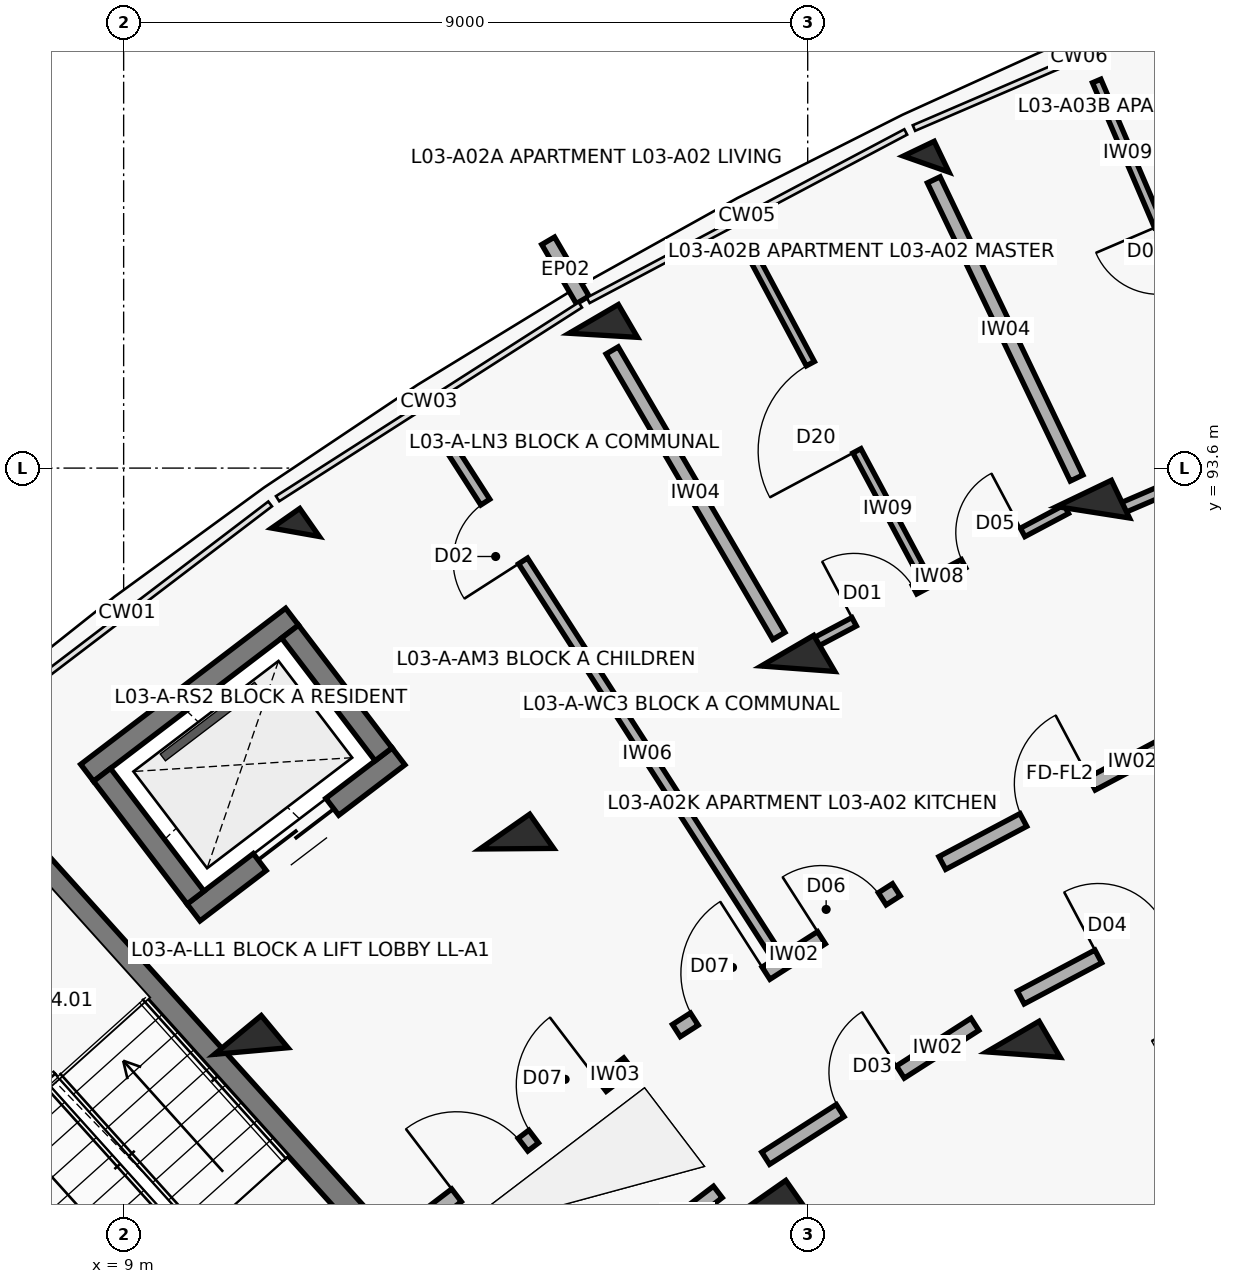
"""IFC4 building model, lengths in metres.
Left out: names, types, materials, properties, quantities, classifications, styles, units other than length and angle.
Written with IfcOpenShell. Run it as: python <this file> out.ifc"""

import sys

from ifc_helpers import new_model, si_unit, direction, frame, frame_2d, origin, origin_2d, place, context, subcontext, project, spatial, rectangle, extrude, element, fill, save


model = new_model("IFC4")
c1 = context("Model", 3, precision=1e-05, world=origin(), true_north=direction((0.0, 1.0)))
c2 = subcontext(c1, "Body", "Model", "MODEL_VIEW")
j1 = project(units=[si_unit("LENGTHUNIT", "METRE"), si_unit("PLANEANGLEUNIT", "RADIAN")], contexts=[c1])
p1 = place(None, origin())
s1 = spatial("IfcSite", under=j1, at=p1, CompositionType="ELEMENT")
p2 = place(p1, origin())
s2 = spatial("IfcBuilding", under=s1, at=p2, CompositionType="ELEMENT")
p3 = place(p2, frame((0.0, 0.0, 11.2)))
s3 = spatial("IfcBuildingStorey", under=s2, at=p3, CompositionType="ELEMENT", Elevation=11.2)
for number, where, z_axis, x_axis in (
    (1, (10.678, 85.93, 0.0), (0.0, 0.0, 1.0), (-0.638, 0.77, 0.0)),
    (2, (17.542, 83.773, 0.0), (0.0, 0.0, 1.0), (-0.573, 0.82, 0.0)),
    (3, (14.172, 88.592, 0.0), (0.0, 0.0, 1.0), (-0.573, 0.82, 0.0)),
):
    element("IfcColumn", number, at=place(p3, frame(where, z_axis=z_axis, x_axis=x_axis)), inside=s3, PredefinedType="COLUMN", context=c2, shape_type="SweptSolid", body=[
        extrude(rectangle(XDim=0.55, YDim=0.8, at=origin_2d()), origin(), (0.0, 0.0, 1.0), 3.1),
    ])
p4 = place(p3, frame((11.261, 92.755, 0.0), z_axis=(0.0, 0.0, 1.0), x_axis=(-0.573004420611, 0.819552276527, 0.0)))
e4 = element("IfcColumn", 4, at=p4, inside=s3, PredefinedType="COLUMN", context=c2, shape_type="SweptSolid", body=[
    extrude(rectangle(XDim=0.45, YDim=0.45, at=origin_2d()), origin(), (0.0, 0.0, 1.0), 3.1),
])
for number, where, z_axis, x_axis in (
    (5, (20.837, 85.882, 0.0), (0.0, 0.0, 1.0), (-0.504, 0.864, 0.0)),
    (6, (17.873, 90.96, 0.0), (0.0, 0.0, 1.0), (-0.504, 0.864, 0.0)),
):
    element("IfcColumn", number, at=place(p3, frame(where, z_axis=z_axis, x_axis=x_axis)), inside=s3, PredefinedType="COLUMN", context=c2, shape_type="SweptSolid", body=[
        extrude(rectangle(XDim=0.55, YDim=0.8, at=origin_2d()), origin(), (0.0, 0.0, 1.0), 3.1),
    ])
p5 = place(p3, frame((15.311, 95.347, 0.0), z_axis=(0.0, 0.0, 1.0), x_axis=(-0.504226211181, 0.863571611366, 0.0)))
e7 = element("IfcColumn", 7, at=p5, inside=s3, PredefinedType="COLUMN", context=c2, shape_type="SweptSolid", body=[
    extrude(rectangle(XDim=0.5, YDim=0.75, at=origin_2d()), origin(), (0.0, 0.0, 1.0), 3.1),
])
p6 = place(p3, frame((21.754, 93.019, 0.0), z_axis=(0.0, 0.0, 1.0), x_axis=(-0.432085748802, 0.901832526405, 0.0)))
e8 = element("IfcColumn", 8, at=p6, inside=s3, PredefinedType="COLUMN", context=c2, shape_type="SweptSolid", body=[
    extrude(rectangle(XDim=0.55, YDim=0.8, at=origin_2d()), origin(), (0.0, 0.0, 1.0), 3.1),
])
p7 = place(p3, frame((19.559, 97.6, 0.0), z_axis=(0.0, 0.0, 1.0), x_axis=(-0.432085748802, 0.901832526405, 0.0)))
e9 = element("IfcColumn", 9, at=p7, inside=s3, PredefinedType="COLUMN", context=c2, shape_type="SweptSolid", body=[
    extrude(rectangle(XDim=0.45, YDim=0.45, at=origin_2d()), origin(), (0.0, 0.0, 1.0), 3.1),
])
p8 = place(p3, frame((15.039, 95.813, 0.0), z_axis=(0.0, 0.0, 1.0), x_axis=(-0.504326383773, 0.863513114336, 0.0)))
e10 = element("IfcWall", 10, at=p8, inside=s3, PredefinedType="PARAPET", context=c2, shape_type="SweptSolid", body=[
    extrude(rectangle(XDim=0.9, YDim=0.195, at=frame_2d((0.45, 0.0))), origin(), (0.0, 0.0, 1.0), 2.25),
])
p9 = place(p3, frame((22.519, 83.042, 0.0), z_axis=(0.0, 0.0, 1.0), x_axis=(0.883438308286, 0.468547495407, 0.0)))
e11 = element("IfcWall", 11, at=p9, inside=s3, PredefinedType="SOLIDWALL", context=c2, shape_type="SweptSolid", body=[
    extrude(rectangle(XDim=3.604, YDim=0.245, at=frame_2d((1.802, 0.0))), origin(), (0.0, 0.0, 1.0), 2.25),
])
p10 = place(p9, frame((0.4, 0.0, 0.0)))
e12 = element("IfcOpeningElement", 12, at=p10, cuts=e11, PredefinedType="OPENING", context=c2, shape_type="SweptSolid", body=[
    extrude(rectangle(XDim=1.1, YDim=2.15, at=frame_2d((0.55, 1.075))), frame((0.0, 0.133, 0.0), z_axis=(0.0, -1.0, 0.0), x_axis=(1.0, 0.0, 0.0)), (0.0, 0.0, 1.0), 0.265),
])
p11 = place(p9, frame((1.754, 0.0, 0.35)))
e13 = element("IfcOpeningElement", 13, at=p11, cuts=e11, PredefinedType="OPENING", context=c2, shape_type="SweptSolid", body=[
    extrude(rectangle(XDim=1.5, YDim=1.65, at=frame_2d((0.75, 0.825))), frame((0.0, 0.133, 0.0), z_axis=(0.0, -1.0, 0.0), x_axis=(1.0, 0.0, 0.0)), (0.0, 0.0, 1.0), 0.265),
])
p12 = place(p3, frame((12.345, 83.461, 0.0), z_axis=(0.0, 0.0, 1.0), x_axis=(-0.668868253964, 0.743380964808, 0.0)))
e14 = element("IfcWall", 14, at=p12, inside=s3, PredefinedType="SHEAR", context=c2, shape_type="SweptSolid", body=[
    extrude(rectangle(XDim=7.69, YDim=0.3, at=frame_2d((3.845, 0.0))), origin(), (0.0, 0.0, 1.0), 3.1),
])
p13 = place(p3, frame((9.691, 81.073, 0.0), z_axis=(0.0, 0.0, 1.0), x_axis=(-0.668885797871, 0.743365179038, 0.0)))
e15 = element("IfcWall", 15, at=p13, inside=s3, PredefinedType="SHEAR", context=c2, shape_type="SweptSolid", body=[
    extrude(rectangle(XDim=7.69, YDim=0.3, at=frame_2d((3.845, 0.0))), origin(), (0.0, 0.0, 1.0), 3.1),
])
p14 = place(p3, frame((12.616, 89.807, 0.0), z_axis=(0.0, 0.0, 1.0), x_axis=(-0.795474703455, -0.605986795371, 0.0)))
e16 = element("IfcWall", 16, at=p14, inside=s3, PredefinedType="SHEAR", context=c2, shape_type="SweptSolid", body=[
    extrude(rectangle(XDim=3.39, YDim=0.28, at=frame_2d((1.695, 0.0))), origin(), (0.0, 0.0, 1.0), 3.1),
])
p15 = place(p14, frame((1.095, 0.0, 0.0)))
e17 = element("IfcOpeningElement", 17, at=p15, cuts=e16, PredefinedType="OPENING", context=c2, shape_type="SweptSolid", body=[
    extrude(rectangle(XDim=1.2, YDim=2.15, at=frame_2d((0.6, 1.075))), frame((0.0, 0.15, 0.0), z_axis=(0.0, -1.0, 0.0), x_axis=(1.0, 0.0, 0.0)), (0.0, 0.0, 1.0), 0.3),
])
p16 = place(p3, frame((11.216, 91.645, 0.0), z_axis=(0.0, 0.0, 1.0), x_axis=(-0.795439986025, -0.606032365994, 0.0)))
e18 = element("IfcWall", 18, at=p16, inside=s3, PredefinedType="SHEAR", context=c2, shape_type="SweptSolid", body=[
    extrude(rectangle(XDim=3.39, YDim=0.28, at=frame_2d((1.695, 0.0))), origin(), (0.0, 0.0, 1.0), 3.1),
])
p17 = place(p3, frame((12.42, 89.834, 0.0), z_axis=(0.0, 0.0, 1.0), x_axis=(-0.605948992168, 0.795503500238, 0.0)))
e19 = element("IfcWall", 19, at=p17, inside=s3, PredefinedType="SHEAR", context=c2, shape_type="SweptSolid", body=[
    extrude(rectangle(XDim=2.03, YDim=0.28, at=frame_2d((1.015, 0.0))), origin(), (0.0, 0.0, 1.0), 3.1),
])
p18 = place(p3, frame((9.946, 87.949, 0.0), z_axis=(0.0, 0.0, 1.0), x_axis=(-0.605891019062, 0.795547656033, 0.0)))
e20 = element("IfcWall", 20, at=p18, inside=s3, PredefinedType="SHEAR", context=c2, shape_type="SweptSolid", body=[
    extrude(rectangle(XDim=2.03, YDim=0.28, at=frame_2d((1.015, 0.0))), origin(), (0.0, 0.0, 1.0), 3.1),
])
p19 = place(p3, frame((13.021, 83.759, 0.0), z_axis=(0.0, 0.0, 1.0), x_axis=(0.795498026433, 0.605956178235, 0.0)))
e21 = element("IfcWall", 21, at=p19, inside=s3, PredefinedType="SOLIDWALL", context=c2, shape_type="SweptSolid", body=[
    extrude(rectangle(XDim=3.296, YDim=0.21, at=frame_2d((1.648, 0.0))), origin(), (0.0, 0.0, 1.0), 2.08),
])
p20 = place(p19, frame((0.45, 0.0, 0.0)))
e22 = element("IfcOpeningElement", 22, at=p20, cuts=e21, PredefinedType="OPENING", context=c2, shape_type="SweptSolid", body=[
    extrude(rectangle(XDim=1.1, YDim=2.15, at=frame_2d((0.55, 1.075))), frame((0.0, 0.115, 0.0), z_axis=(0.0, -1.0, 0.0), x_axis=(1.0, 0.0, 0.0)), (0.0, 0.0, 1.0), 0.23),
])
p21 = place(p19, frame((1.726, 0.0, 0.0)))
e23 = element("IfcOpeningElement", 23, at=p21, cuts=e21, PredefinedType="OPENING", context=c2, shape_type="SweptSolid", body=[
    extrude(rectangle(XDim=1.12, YDim=2.15, at=frame_2d((0.56, 1.075))), frame((0.0, 0.115, 0.0), z_axis=(0.0, -1.0, 0.0), x_axis=(1.0, 0.0, 0.0)), (0.0, 0.0, 1.0), 0.23),
])
p22 = place(p3, frame((14.329, 82.18, 0.0), z_axis=(0.0, 0.0, 1.0), x_axis=(0.795501577908, 0.605951515838, 0.0)))
e24 = element("IfcWall", 24, at=p22, inside=s3, PredefinedType="SOLIDWALL", context=c2, shape_type="SweptSolid", body=[
    extrude(rectangle(XDim=3.129, YDim=0.19, at=frame_2d((1.564, 0.0))), origin(), (0.0, 0.0, 1.0), 2.08),
])
p23 = place(p22, frame((1.004, 0.0, 0.0)))
e25 = element("IfcOpeningElement", 25, at=p23, cuts=e24, PredefinedType="OPENING", context=c2, shape_type="SweptSolid", body=[
    extrude(rectangle(XDim=1.12, YDim=2.15, at=frame_2d((0.56, 1.075))), frame((0.0, 0.105, 0.0), z_axis=(0.0, -1.0, 0.0), x_axis=(1.0, 0.0, 0.0)), (0.0, 0.0, 1.0), 0.21),
])
p24 = place(p3, frame((16.272, 86.199, 0.0), z_axis=(0.0, 0.0, 1.0), x_axis=(0.842257205985, 0.539075874963, 0.0)))
e26 = element("IfcWall", 26, at=p24, inside=s3, PredefinedType="SOLIDWALL", context=c2, shape_type="SweptSolid", body=[
    extrude(rectangle(XDim=3.436, YDim=0.19, at=frame_2d((1.718, 0.0))), origin(), (0.0, 0.0, 1.0), 2.08),
])
p25 = place(p24, frame((0.28, 0.0, 0.0)))
e27 = element("IfcOpeningElement", 27, at=p25, cuts=e26, PredefinedType="OPENING", context=c2, shape_type="SweptSolid", body=[
    extrude(rectangle(XDim=1.12, YDim=2.15, at=frame_2d((0.56, 1.075))), frame((0.0, 0.105, 0.0), z_axis=(0.0, -1.0, 0.0), x_axis=(1.0, 0.0, 0.0)), (0.0, 0.0, 1.0), 0.21),
])
p26 = place(p24, frame((2.266, 0.0, 0.0)))
e28 = element("IfcOpeningElement", 28, at=p26, cuts=e26, PredefinedType="OPENING", context=c2, shape_type="SweptSolid", body=[
    extrude(rectangle(XDim=0.95, YDim=2.1, at=frame_2d((0.475, 1.05))), frame((0.0, 0.105, 0.0), z_axis=(0.0, -1.0, 0.0), x_axis=(1.0, 0.0, 0.0)), (0.0, 0.0, 1.0), 0.21),
])
p27 = place(p3, frame((17.447, 84.519, 0.0), z_axis=(0.0, 0.0, 1.0), x_axis=(0.842225276846, 0.539125758095, 0.0)))
e29 = element("IfcWall", 29, at=p27, inside=s3, PredefinedType="SOLIDWALL", context=c2, shape_type="SweptSolid", body=[
    extrude(rectangle(XDim=3.269, YDim=0.19, at=frame_2d((1.634, 0.0))), origin(), (0.0, 0.0, 1.0), 2.08),
])
p28 = place(p27, frame((1.164, 0.0, 0.0)))
e30 = element("IfcOpeningElement", 30, at=p28, cuts=e29, PredefinedType="OPENING", context=c2, shape_type="SweptSolid", body=[
    extrude(rectangle(XDim=0.94, YDim=2.1, at=frame_2d((0.47, 1.05))), frame((0.0, 0.105, 0.0), z_axis=(0.0, -1.0, 0.0), x_axis=(1.0, 0.0, 0.0)), (0.0, 0.0, 1.0), 0.21),
])
p29 = place(p3, frame((17.524, 87.288, 0.0), z_axis=(0.0, 0.0, 1.0), x_axis=(-0.540338452216, 0.841447774408, 0.0)))
e31 = element("IfcWall", 31, at=p29, inside=s3, PredefinedType="PARTITIONING", context=c2, shape_type="SweptSolid", body=[
    extrude(rectangle(XDim=7.95, YDim=0.14, at=frame_2d((3.975, 0.0))), origin(), (0.0, 0.0, 1.0), 2.08),
])
p30 = place(p29, frame((6.05, 0.0, 0.0)))
e32 = element("IfcOpeningElement", 32, at=p30, cuts=e31, PredefinedType="OPENING", context=c2, shape_type="SweptSolid", body=[
    extrude(rectangle(XDim=0.92, YDim=2.1, at=frame_2d((0.46, 1.05))), frame((0.0, 0.08, 0.0), z_axis=(0.0, -1.0, 0.0), x_axis=(1.0, 0.0, 0.0)), (0.0, 0.0, 1.0), 0.16),
])
p31 = place(p3, frame((19.77, 88.404, 0.0), z_axis=(0.0, 0.0, 1.0), x_axis=(0.883410853063, 0.468599258099, 0.0)))
e33 = element("IfcWall", 33, at=p31, inside=s3, PredefinedType="SOLIDWALL", context=c2, shape_type="SweptSolid", body=[
    extrude(rectangle(XDim=3.436, YDim=0.19, at=frame_2d((1.718, 0.0))), origin(), (0.0, 0.0, 1.0), 2.08),
])
p32 = place(p31, frame((1.208, 0.0, 0.0)))
e34 = element("IfcOpeningElement", 34, at=p32, cuts=e33, PredefinedType="OPENING", context=c2, shape_type="SweptSolid", body=[
    extrude(rectangle(XDim=1.02, YDim=2.15, at=frame_2d((0.51, 1.075))), frame((0.0, 0.105, 0.0), z_axis=(0.0, -1.0, 0.0), x_axis=(1.0, 0.0, 0.0)), (0.0, 0.0, 1.0), 0.21),
])
p33 = place(p3, frame((20.804, 86.634, 0.0), z_axis=(0.0, 0.0, 1.0), x_axis=(0.883444301944, 0.468536194293, 0.0)))
e35 = element("IfcWall", 35, at=p33, inside=s3, PredefinedType="SOLIDWALL", context=c2, shape_type="SweptSolid", body=[
    extrude(rectangle(XDim=3.269, YDim=0.19, at=frame_2d((1.634, 0.0))), origin(), (0.0, 0.0, 1.0), 2.08),
])
p34 = place(p33, frame((1.154, 0.0, 0.0)))
e36 = element("IfcOpeningElement", 36, at=p34, cuts=e35, PredefinedType="OPENING", context=c2, shape_type="SweptSolid", body=[
    extrude(rectangle(XDim=0.96, YDim=2.1, at=frame_2d((0.48, 1.05))), frame((0.0, 0.105, 0.0), z_axis=(0.0, -1.0, 0.0), x_axis=(1.0, 0.0, 0.0)), (0.0, 0.0, 1.0), 0.21),
])
p35 = place(p3, frame((18.037, 91.273, 0.0), z_axis=(0.0, 0.0, 1.0), x_axis=(0.883441603894, 0.468541281543, 0.0)))
e37 = element("IfcWall", 37, at=p35, inside=s3, PredefinedType="PARTITIONING", context=c2, shape_type="SweptSolid", body=[
    extrude(rectangle(XDim=3.81, YDim=0.125, at=frame_2d((1.905, 0.0))), origin(), (0.0, 0.0, 1.0), 2.08),
])
p36 = place(p35, frame((0.65, 0.0, 0.0)))
e38 = element("IfcOpeningElement", 38, at=p36, cuts=e37, PredefinedType="OPENING", context=c2, shape_type="SweptSolid", body=[
    extrude(rectangle(XDim=0.9, YDim=2.1, at=frame_2d((0.45, 1.05))), frame((0.0, 0.073, 0.0), z_axis=(0.0, -1.0, 0.0), x_axis=(1.0, 0.0, 0.0)), (0.0, 0.0, 1.0), 0.145),
])
p37 = place(p35, frame((2.28, 0.0, 0.0)))
e39 = element("IfcOpeningElement", 39, at=p37, cuts=e37, PredefinedType="OPENING", context=c2, shape_type="SweptSolid", body=[
    extrude(rectangle(XDim=0.88, YDim=2.1, at=frame_2d((0.44, 1.05))), frame((0.0, 0.073, 0.0), z_axis=(0.0, -1.0, 0.0), x_axis=(1.0, 0.0, 0.0)), (0.0, 0.0, 1.0), 0.145),
])
p38 = place(p3, frame((19.46, 92.306, 0.0), z_axis=(0.0, 0.0, 1.0), x_axis=(-0.471228378949, 0.88201123285, 0.0)))
e40 = element("IfcWall", 40, at=p38, inside=s3, PredefinedType="PARTITIONING", context=c2, shape_type="SweptSolid", body=[
    extrude(rectangle(XDim=4.75, YDim=0.12, at=frame_2d((2.375, 0.0))), origin(), (0.0, 0.0, 1.0), 2.08),
])
p39 = place(p38, frame((1.725, 0.0, 0.0)))
e41 = element("IfcOpeningElement", 41, at=p39, cuts=e40, PredefinedType="OPENING", context=c2, shape_type="SweptSolid", body=[
    extrude(rectangle(XDim=1.3, YDim=2.1, at=frame_2d((0.65, 1.05))), frame((0.0, 0.07, 0.0), z_axis=(0.0, -1.0, 0.0), x_axis=(1.0, 0.0, 0.0)), (0.0, 0.0, 1.0), 0.14),
])
p40 = place(p3, frame((17.621, 91.392, 0.0), z_axis=(0.0, 0.0, 1.0), x_axis=(-0.504216452091, 0.863577309475, 0.0)))
e42 = element("IfcWall", 42, at=p40, inside=s3, PredefinedType="SOLIDWALL", context=c2, shape_type="SweptSolid", body=[
    extrude(rectangle(XDim=4.35, YDim=0.185, at=frame_2d((2.175, 0.0))), origin(), (0.0, 0.0, 1.0), 2.08),
])
p41 = place(p3, frame((22.073, 93.047, 0.0), z_axis=(0.0, 0.0, 1.0), x_axis=(0.918737522346, 0.394868794707, 0.0)))
e43 = element("IfcWall", 43, at=p41, inside=s3, PredefinedType="PARTITIONING", context=c2, shape_type="SweptSolid", body=[
    extrude(rectangle(XDim=3.785, YDim=0.14, at=frame_2d((1.893, 0.0))), origin(), (0.0, 0.0, 1.0), 2.08),
])
p42 = place(p41, frame((0.65, 0.0, 0.0)))
e44 = element("IfcOpeningElement", 44, at=p42, cuts=e43, PredefinedType="OPENING", context=c2, shape_type="SweptSolid", body=[
    extrude(rectangle(XDim=0.9, YDim=2.1, at=frame_2d((0.45, 1.05))), frame((0.0, 0.08, 0.0), z_axis=(0.0, -1.0, 0.0), x_axis=(1.0, 0.0, 0.0)), (0.0, 0.0, 1.0), 0.16),
])
p43 = place(p41, frame((2.255, 0.0, 0.0)))
e45 = element("IfcOpeningElement", 45, at=p43, cuts=e43, PredefinedType="OPENING", context=c2, shape_type="SweptSolid", body=[
    extrude(rectangle(XDim=0.88, YDim=2.1, at=frame_2d((0.44, 1.05))), frame((0.0, 0.08, 0.0), z_axis=(0.0, -1.0, 0.0), x_axis=(1.0, 0.0, 0.0)), (0.0, 0.0, 1.0), 0.16),
])
p44 = place(p3, frame((23.789, 94.051, 0.0), z_axis=(0.0, 0.0, 1.0), x_axis=(-0.393539995583, 0.919307495823, 0.0)))
e46 = element("IfcWall", 46, at=p44, inside=s3, PredefinedType="PARTITIONING", context=c2, shape_type="SweptSolid", body=[
    extrude(rectangle(XDim=5.05, YDim=0.12, at=frame_2d((2.525, 0.0))), origin(), (0.0, 0.0, 1.0), 2.08),
])
p45 = place(p44, frame((2.075, 0.0, 0.0)))
e47 = element("IfcOpeningElement", 47, at=p45, cuts=e46, PredefinedType="OPENING", context=c2, shape_type="SweptSolid", body=[
    extrude(rectangle(XDim=0.9, YDim=2.1, at=frame_2d((0.45, 1.05))), frame((0.0, 0.07, 0.0), z_axis=(0.0, -1.0, 0.0), x_axis=(1.0, 0.0, 0.0)), (0.0, 0.0, 1.0), 0.14),
])
p46 = place(p3, frame((21.538, 93.469, 0.0), z_axis=(0.0, 0.0, 1.0), x_axis=(-0.432086898897, 0.901831975371, 0.0)))
e48 = element("IfcWall", 48, at=p46, inside=s3, PredefinedType="SOLIDWALL", context=c2, shape_type="SweptSolid", body=[
    extrude(rectangle(XDim=4.35, YDim=0.185, at=frame_2d((2.175, 0.0))), origin(), (0.0, 0.0, 1.0), 2.08),
])
p47 = place(p15, origin())
e49 = element("IfcDoor", 49, at=p47, inside=s3, OperationType="DOUBLE_DOOR_SLIDING", PredefinedType="DOOR", context=c2, shape_type="SweptSolid", body=[
    extrude(rectangle(XDim=1.2, YDim=2.15, at=frame_2d((0.6, 1.075))), frame((0.0, 0.025, 0.0), z_axis=(0.0, -1.0, 0.0), x_axis=(1.0, 0.0, 0.0)), (0.0, 0.0, 1.0), 0.05),
])
fill(e17, e49)
p48 = place(p20, origin())
e50 = element("IfcDoor", 50, at=p48, inside=s3, OperationType="SINGLE_SWING_LEFT", PredefinedType="DOOR", context=c2, shape_type="SweptSolid", body=[
    extrude(rectangle(XDim=1.1, YDim=2.15, at=frame_2d((0.55, 1.075))), frame((0.0, 0.025, 0.0), z_axis=(0.0, -1.0, 0.0), x_axis=(1.0, 0.0, 0.0)), (0.0, 0.0, 1.0), 0.05),
])
fill(e22, e50)
p49 = place(p21, origin())
e51 = element("IfcDoor", 51, at=p49, inside=s3, OperationType="SINGLE_SWING_RIGHT", PredefinedType="DOOR", context=c2, shape_type="SweptSolid", body=[
    extrude(rectangle(XDim=1.12, YDim=2.15, at=frame_2d((0.56, 1.075))), frame((0.0, 0.025, 0.0), z_axis=(0.0, -1.0, 0.0), x_axis=(1.0, 0.0, 0.0)), (0.0, 0.0, 1.0), 0.05),
])
fill(e23, e51)
p50 = place(p25, origin())
e52 = element("IfcDoor", 52, at=p50, inside=s3, OperationType="SINGLE_SWING_RIGHT", PredefinedType="DOOR", context=c2, shape_type="SweptSolid", body=[
    extrude(rectangle(XDim=1.12, YDim=2.15, at=frame_2d((0.56, 1.075))), frame((0.0, 0.025, 0.0), z_axis=(0.0, -1.0, 0.0), x_axis=(1.0, 0.0, 0.0)), (0.0, 0.0, 1.0), 0.05),
])
fill(e27, e52)
p51 = place(p26, origin())
e53 = element("IfcDoor", 53, at=p51, inside=s3, OperationType="SINGLE_SWING_LEFT", PredefinedType="DOOR", context=c2, shape_type="SweptSolid", body=[
    extrude(rectangle(XDim=0.95, YDim=2.1, at=frame_2d((0.475, 1.05))), frame((0.0, 0.025, 0.0), z_axis=(0.0, -1.0, 0.0), x_axis=(1.0, 0.0, 0.0)), (0.0, 0.0, 1.0), 0.05),
])
fill(e28, e53)
p52 = place(p28, origin())
e54 = element("IfcDoor", 54, at=p52, inside=s3, OperationType="SINGLE_SWING_RIGHT", PredefinedType="DOOR", context=c2, shape_type="SweptSolid", body=[
    extrude(rectangle(XDim=0.94, YDim=2.1, at=frame_2d((0.47, 1.05))), frame((0.0, 0.025, 0.0), z_axis=(0.0, -1.0, 0.0), x_axis=(1.0, 0.0, 0.0)), (0.0, 0.0, 1.0), 0.05),
])
fill(e30, e54)
p53 = place(p30, origin())
e55 = element("IfcDoor", 55, at=p53, inside=s3, OperationType="SINGLE_SWING_LEFT", PredefinedType="DOOR", context=c2, shape_type="SweptSolid", body=[
    extrude(rectangle(XDim=0.92, YDim=2.1, at=frame_2d((0.46, 1.05))), frame((0.0, 0.025, 0.0), z_axis=(0.0, -1.0, 0.0), x_axis=(1.0, 0.0, 0.0)), (0.0, 0.0, 1.0), 0.05),
])
fill(e32, e55)
p54 = place(p32, origin())
e56 = element("IfcDoor", 56, at=p54, inside=s3, OperationType="SINGLE_SWING_RIGHT", PredefinedType="DOOR", context=c2, shape_type="SweptSolid", body=[
    extrude(rectangle(XDim=1.02, YDim=2.15, at=frame_2d((0.51, 1.075))), frame((0.0, 0.025, 0.0), z_axis=(0.0, -1.0, 0.0), x_axis=(1.0, 0.0, 0.0)), (0.0, 0.0, 1.0), 0.05),
])
fill(e34, e56)
p55 = place(p34, origin())
e57 = element("IfcDoor", 57, at=p55, inside=s3, OperationType="SINGLE_SWING_LEFT", PredefinedType="DOOR", context=c2, shape_type="SweptSolid", body=[
    extrude(rectangle(XDim=0.96, YDim=2.1, at=frame_2d((0.48, 1.05))), frame((0.0, 0.025, 0.0), z_axis=(0.0, -1.0, 0.0), x_axis=(1.0, 0.0, 0.0)), (0.0, 0.0, 1.0), 0.05),
])
fill(e36, e57)
p56 = place(p36, origin())
e58 = element("IfcDoor", 58, at=p56, inside=s3, OperationType="SINGLE_SWING_LEFT", PredefinedType="DOOR", context=c2, shape_type="SweptSolid", body=[
    extrude(rectangle(XDim=0.9, YDim=2.1, at=frame_2d((0.45, 1.05))), frame((0.0, 0.025, 0.0), z_axis=(0.0, -1.0, 0.0), x_axis=(1.0, 0.0, 0.0)), (0.0, 0.0, 1.0), 0.05),
])
fill(e38, e58)
p57 = place(p37, origin())
e59 = element("IfcDoor", 59, at=p57, inside=s3, OperationType="SINGLE_SWING_RIGHT", PredefinedType="DOOR", context=c2, shape_type="SweptSolid", body=[
    extrude(rectangle(XDim=0.88, YDim=2.1, at=frame_2d((0.44, 1.05))), frame((0.0, 0.025, 0.0), z_axis=(0.0, -1.0, 0.0), x_axis=(1.0, 0.0, 0.0)), (0.0, 0.0, 1.0), 0.05),
])
fill(e39, e59)
p58 = place(p39, origin())
e60 = element("IfcDoor", 60, at=p58, inside=s3, OperationType="SINGLE_SWING_LEFT", PredefinedType="DOOR", context=c2, shape_type="SweptSolid", body=[
    extrude(rectangle(XDim=1.3, YDim=2.1, at=frame_2d((0.65, 1.05))), frame((0.0, 0.025, 0.0), z_axis=(0.0, -1.0, 0.0), x_axis=(1.0, 0.0, 0.0)), (0.0, 0.0, 1.0), 0.05),
])
fill(e41, e60)
save(model, sys.argv[1])
